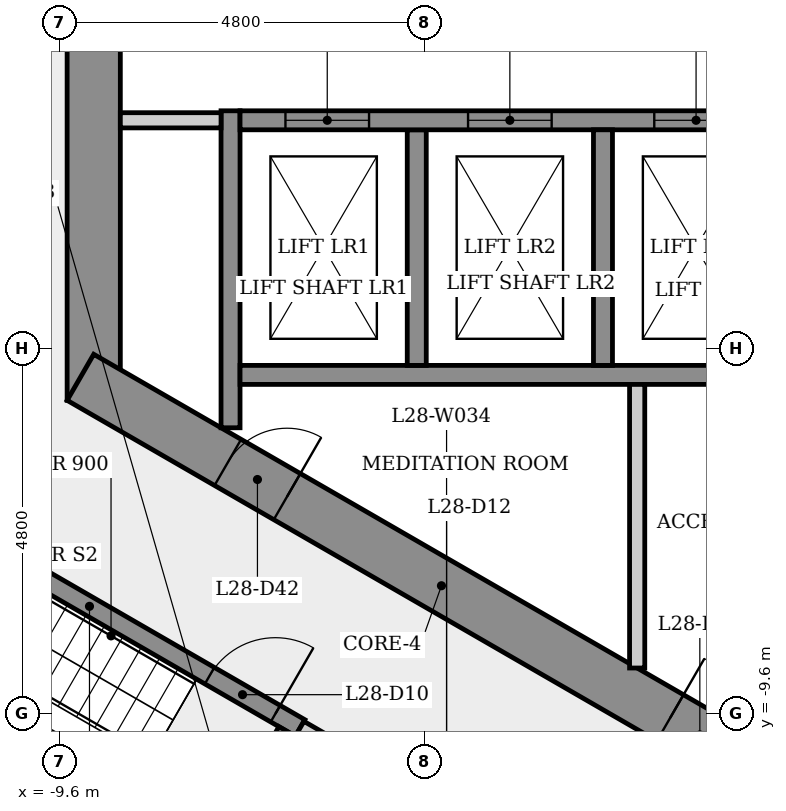
"""IFC4 building model, lengths in metres.
Left out: names, types, materials, properties, quantities, classifications, styles, units other than length and angle.
Written with IfcOpenShell. Run it as: python <this file> out.ifc"""

import sys

from ifc_helpers import new_model, si_unit, direction, frame, frame_2d, origin, place, context, subcontext, project, spatial, rectangle, extrude, element, fill, save


model = new_model("IFC4")
c1 = context("Model", 3, precision=1e-05, world=origin(), true_north=direction((0.0, 1.0)))
c2 = subcontext(c1, "Body", "Model", "MODEL_VIEW")
j1 = project(units=[si_unit("LENGTHUNIT", "METRE"), si_unit("PLANEANGLEUNIT", "RADIAN")], contexts=[c1])
p1 = place(None, origin())
s1 = spatial("IfcSite", under=j1, at=p1, CompositionType="ELEMENT")
p2 = place(p1, origin())
s2 = spatial("IfcBuilding", under=s1, at=p2, CompositionType="ELEMENT")
p3 = place(p2, frame((0.0, 0.0, 106.9)))
s3 = spatial("IfcBuildingStorey", under=s2, at=p3, CompositionType="ELEMENT", Elevation=106.9)
p4 = place(p3, frame((-9.15, 5.485, 0.0), z_axis=(0.0, 0.0, 1.0), x_axis=(0.0, -1.0, 0.0)))
e1 = element("IfcWall", 1, at=p4, inside=s3, PredefinedType="SHEAR", context=c2, shape_type="SweptSolid", body=[
    extrude(rectangle(XDim=10.97, YDim=0.7, at=frame_2d((5.485, 0.0))), origin(), (0.0, 0.0, 1.0), 3.4),
])
p5 = place(p4, frame((4.685, 0.0, 0.0)))
e2 = element("IfcOpeningElement", 2, at=p5, cuts=e1, PredefinedType="OPENING", context=c2, shape_type="SweptSolid", body=[
    extrude(rectangle(XDim=1.6, YDim=2.1, at=frame_2d((0.8, 1.05))), frame((0.0, 0.36, 0.0), z_axis=(0.0, -1.0, 0.0), x_axis=(1.0, 0.0, 0.0)), (0.0, 0.0, 1.0), 0.72),
])
p6 = place(p3, frame((-9.325, -5.182, 0.0), z_axis=(0.0, 0.0, 1.0), x_axis=(0.866023993627, -0.500002442456, 0.0)))
e3 = element("IfcWall", 3, at=p6, inside=s3, PredefinedType="SHEAR", context=c2, shape_type="SweptSolid", body=[
    extrude(rectangle(XDim=10.97, YDim=0.7, at=frame_2d((5.485, 0.0))), origin(), (0.0, 0.0, 1.0), 3.4),
])
p7 = place(p6, frame((2.239, 0.0, 0.0)))
e4 = element("IfcOpeningElement", 4, at=p7, cuts=e3, PredefinedType="OPENING", context=c2, shape_type="SweptSolid", body=[
    extrude(rectangle(XDim=0.9, YDim=2.1, at=frame_2d((0.45, 1.05))), frame((0.0, 0.36, 0.0), z_axis=(0.0, -1.0, 0.0), x_axis=(1.0, 0.0, 0.0)), (0.0, 0.0, 1.0), 0.72),
])
p8 = place(p6, frame((8.96, 0.0, 0.0)))
e5 = element("IfcOpeningElement", 5, at=p8, cuts=e3, PredefinedType="OPENING", context=c2, shape_type="SweptSolid", body=[
    extrude(rectangle(XDim=0.9, YDim=2.1, at=frame_2d((0.45, 1.05))), frame((0.0, 0.36, 0.0), z_axis=(0.0, -1.0, 0.0), x_axis=(1.0, 0.0, 0.0)), (0.0, 0.0, 1.0), 0.72),
])
p9 = place(p3, frame((-11.977, -6.595, 0.0), z_axis=(0.0, 0.0, 1.0), x_axis=(0.866025499775, -0.499999833739, 0.0)))
e6 = element("IfcWall", 6, at=p9, inside=s3, PredefinedType="SHEAR", context=c2, shape_type="SweptSolid", body=[
    extrude(rectangle(XDim=6.4, YDim=0.25, at=frame_2d((3.2, 0.0))), origin(), (0.0, 0.0, 1.0), 3.05),
])
p10 = place(p9, frame((5.025, 0.0, 0.0)))
e7 = element("IfcOpeningElement", 7, at=p10, cuts=e6, PredefinedType="OPENING", context=c2, shape_type="SweptSolid", body=[
    extrude(rectangle(XDim=1.0, YDim=2.1, at=frame_2d((0.5, 1.05))), frame((0.0, 0.135, 0.0), z_axis=(0.0, -1.0, 0.0), x_axis=(1.0, 0.0, 0.0)), (0.0, 0.0, 1.0), 0.27),
])
p11 = place(p3, frame((-7.935, -12.393, 0.0), z_axis=(0.0, 0.0, 1.0), x_axis=(-0.866025499775, 0.499999833739, 0.0)))
e8 = element("IfcWall", 8, at=p11, inside=s3, PredefinedType="SHEAR", context=c2, shape_type="SweptSolid", body=[
    extrude(rectangle(XDim=6.4, YDim=0.25, at=frame_2d((3.2, 0.0))), origin(), (0.0, 0.0, 1.0), 3.05),
])
p12 = place(p3, frame((-7.35, -5.846, 0.0), z_axis=(0.0, 0.0, 1.0), x_axis=(0.0, 1.0, 0.0)))
e9 = element("IfcWall", 9, at=p12, inside=s3, PredefinedType="SHEAR", context=c2, shape_type="SweptSolid", body=[
    extrude(rectangle(XDim=4.171, YDim=0.25, at=frame_2d((2.085, 0.0))), origin(), (0.0, 0.0, 1.0), 3.05),
])
p13 = place(p3, frame((-7.475, -1.8, 0.0), z_axis=(0.0, 0.0, 1.0), x_axis=(-1.0, 0.0, 0.0)))
e10 = element("IfcWall", 10, at=p13, inside=s3, PredefinedType="PARTITIONING", context=c2, shape_type="SweptSolid", body=[
    extrude(rectangle(XDim=1.325, YDim=0.2, at=frame_2d((0.663, 0.0))), origin(), (0.0, 0.0, 1.0), 3.05),
])
p14 = place(p3, frame((-6.605, -9.841, 0.0), z_axis=(0.0, 0.0, 1.0), x_axis=(-0.499996545922, -0.866027397988, 0.0)))
e11 = element("IfcWall", 11, at=p14, inside=s3, PredefinedType="SHEAR", context=c2, shape_type="SweptSolid", body=[
    extrude(rectangle(XDim=2.75, YDim=0.25, at=frame_2d((1.375, 0.0))), origin(), (0.0, 0.0, 1.0), 3.05),
])
p15 = place(p14, frame((0.875, 0.0, 0.0)))
e12 = element("IfcOpeningElement", 12, at=p15, cuts=e11, PredefinedType="OPENING", context=c2, shape_type="SweptSolid", body=[
    extrude(rectangle(XDim=1.0, YDim=2.1, at=frame_2d((0.5, 1.05))), frame((0.0, 0.135, 0.0), z_axis=(0.0, -1.0, 0.0), x_axis=(1.0, 0.0, 0.0)), (0.0, 0.0, 1.0), 0.27),
])
p16 = place(p3, frame((-6.435, -9.795, 0.0), z_axis=(0.0, 0.0, 1.0), x_axis=(0.866012907634, -0.500021643343, 0.0)))
e13 = element("IfcWall", 13, at=p16, inside=s3, PredefinedType="PARTITIONING", context=c2, shape_type="SweptSolid", body=[
    extrude(rectangle(XDim=4.45, YDim=0.2, at=frame_2d((2.225, 0.0))), origin(), (0.0, 0.0, 1.0), 3.05),
])
p17 = place(p16, frame((1.675, 0.0, 0.0)))
e14 = element("IfcOpeningElement", 14, at=p17, cuts=e13, PredefinedType="OPENING", context=c2, shape_type="SweptSolid", body=[
    extrude(rectangle(XDim=1.1, YDim=2.1, at=frame_2d((0.55, 1.05))), frame((0.0, 0.11, 0.0), z_axis=(0.0, -1.0, 0.0), x_axis=(1.0, 0.0, 0.0)), (0.0, 0.0, 1.0), 0.22),
])
p18 = place(p3, frame((-7.225, -5.15, 0.0), z_axis=(0.0, 0.0, 1.0), x_axis=(1.0, 0.0, 0.0)))
e15 = element("IfcWall", 15, at=p18, inside=s3, PredefinedType="SHEAR", context=c2, shape_type="SweptSolid", body=[
    extrude(rectangle(XDim=14.7, YDim=0.25, at=frame_2d((7.35, 0.0))), origin(), (0.0, 0.0, 1.0), 3.05),
])
p19 = place(p3, frame((-4.9, -1.925, 0.0), z_axis=(0.0, 0.0, 1.0), x_axis=(0.0, -1.0, 0.0)))
e16 = element("IfcWall", 16, at=p19, inside=s3, PredefinedType="SHEAR", context=c2, shape_type="SweptSolid", body=[
    extrude(rectangle(XDim=3.1, YDim=0.25, at=frame_2d((1.55, 0.0))), origin(), (0.0, 0.0, 1.0), 3.4),
])
p20 = place(p3, frame((-7.225, -1.8, 0.0), z_axis=(0.0, 0.0, 1.0), x_axis=(1.0, 0.0, 0.0)))
e17 = element("IfcWall", 17, at=p20, inside=s3, PredefinedType="SHEAR", context=c2, shape_type="SweptSolid", body=[
    extrude(rectangle(XDim=14.7, YDim=0.25, at=frame_2d((7.35, 0.0))), origin(), (0.0, 0.0, 1.0), 3.05),
])
p21 = place(p20, frame((0.597, 0.0, 0.0)))
e18 = element("IfcOpeningElement", 18, at=p21, cuts=e17, PredefinedType="OPENING", context=c2, shape_type="SweptSolid", body=[
    extrude(rectangle(XDim=1.1, YDim=2.1, at=frame_2d((0.55, 1.05))), frame((0.0, 0.135, 0.0), z_axis=(0.0, -1.0, 0.0), x_axis=(1.0, 0.0, 0.0)), (0.0, 0.0, 1.0), 0.27),
])
p22 = place(p20, frame((3.0, 0.0, 0.0)))
e19 = element("IfcOpeningElement", 19, at=p22, cuts=e17, PredefinedType="OPENING", context=c2, shape_type="SweptSolid", body=[
    extrude(rectangle(XDim=1.1, YDim=2.1, at=frame_2d((0.55, 1.05))), frame((0.0, 0.135, 0.0), z_axis=(0.0, -1.0, 0.0), x_axis=(1.0, 0.0, 0.0)), (0.0, 0.0, 1.0), 0.27),
])
p23 = place(p20, frame((5.45, 0.0, 0.0)))
e20 = element("IfcOpeningElement", 20, at=p23, cuts=e17, PredefinedType="OPENING", context=c2, shape_type="SweptSolid", body=[
    extrude(rectangle(XDim=1.1, YDim=2.1, at=frame_2d((0.55, 1.05))), frame((0.0, 0.135, 0.0), z_axis=(0.0, -1.0, 0.0), x_axis=(1.0, 0.0, 0.0)), (0.0, 0.0, 1.0), 0.27),
])
p24 = place(p20, frame((7.9, 0.0, 0.0)))
e21 = element("IfcOpeningElement", 21, at=p24, cuts=e17, PredefinedType="OPENING", context=c2, shape_type="SweptSolid", body=[
    extrude(rectangle(XDim=1.1, YDim=2.1, at=frame_2d((0.55, 1.05))), frame((0.0, 0.135, 0.0), z_axis=(0.0, -1.0, 0.0), x_axis=(1.0, 0.0, 0.0)), (0.0, 0.0, 1.0), 0.27),
])
p25 = place(p20, frame((10.35, 0.0, 0.0)))
e22 = element("IfcOpeningElement", 22, at=p25, cuts=e17, PredefinedType="OPENING", context=c2, shape_type="SweptSolid", body=[
    extrude(rectangle(XDim=1.1, YDim=2.1, at=frame_2d((0.55, 1.05))), frame((0.0, 0.135, 0.0), z_axis=(0.0, -1.0, 0.0), x_axis=(1.0, 0.0, 0.0)), (0.0, 0.0, 1.0), 0.27),
])
p26 = place(p3, frame((-2.45, -1.925, 0.0), z_axis=(0.0, 0.0, 1.0), x_axis=(0.0, -1.0, 0.0)))
e23 = element("IfcWall", 23, at=p26, inside=s3, PredefinedType="SHEAR", context=c2, shape_type="SweptSolid", body=[
    extrude(rectangle(XDim=3.1, YDim=0.25, at=frame_2d((1.55, 0.0))), origin(), (0.0, 0.0, 1.0), 3.4),
])
p27 = place(p3, frame((-2.0, -5.275, 0.0), z_axis=(0.0, 0.0, 1.0), x_axis=(0.0, -1.0, 0.0)))
e24 = element("IfcWall", 24, at=p27, inside=s3, PredefinedType="PARTITIONING", context=c2, shape_type="SweptSolid", body=[
    extrude(rectangle(XDim=3.732, YDim=0.2, at=frame_2d((1.866, 0.0))), origin(), (0.0, 0.0, 1.0), 3.05),
])
p28 = place(p21, origin())
e25 = element("IfcDoor", 25, at=p28, inside=s3, OperationType="SLIDING_TO_LEFT", PredefinedType="DOOR", context=c2, shape_type="SweptSolid", body=[
    extrude(rectangle(XDim=1.1, YDim=2.1, at=frame_2d((0.55, 1.05))), frame((0.0, 0.025, 0.0), z_axis=(0.0, -1.0, 0.0), x_axis=(1.0, 0.0, 0.0)), (0.0, 0.0, 1.0), 0.05),
])
fill(e18, e25)
p29 = place(p22, origin())
e26 = element("IfcDoor", 26, at=p29, inside=s3, OperationType="SLIDING_TO_LEFT", PredefinedType="DOOR", context=c2, shape_type="SweptSolid", body=[
    extrude(rectangle(XDim=1.1, YDim=2.1, at=frame_2d((0.55, 1.05))), frame((0.0, 0.025, 0.0), z_axis=(0.0, -1.0, 0.0), x_axis=(1.0, 0.0, 0.0)), (0.0, 0.0, 1.0), 0.05),
])
fill(e19, e26)
p30 = place(p23, origin())
e27 = element("IfcDoor", 27, at=p30, inside=s3, OperationType="SLIDING_TO_LEFT", PredefinedType="DOOR", context=c2, shape_type="SweptSolid", body=[
    extrude(rectangle(XDim=1.1, YDim=2.1, at=frame_2d((0.55, 1.05))), frame((0.0, 0.025, 0.0), z_axis=(0.0, -1.0, 0.0), x_axis=(1.0, 0.0, 0.0)), (0.0, 0.0, 1.0), 0.05),
])
fill(e20, e27)
p31 = place(p10, origin())
e28 = element("IfcDoor", 28, at=p31, inside=s3, OperationType="SINGLE_SWING_RIGHT", PredefinedType="DOOR", context=c2, shape_type="SweptSolid", body=[
    extrude(rectangle(XDim=1.0, YDim=2.1, at=frame_2d((0.5, 1.05))), frame((0.0, 0.025, 0.0), z_axis=(0.0, -1.0, 0.0), x_axis=(1.0, 0.0, 0.0)), (0.0, 0.0, 1.0), 0.05),
])
fill(e7, e28)
p32 = place(p7, origin())
e29 = element("IfcDoor", 29, at=p32, inside=s3, OperationType="SINGLE_SWING_RIGHT", PredefinedType="DOOR", context=c2, shape_type="SweptSolid", body=[
    extrude(rectangle(XDim=0.9, YDim=2.1, at=frame_2d((0.45, 1.05))), frame((0.0, 0.025, 0.0), z_axis=(0.0, -1.0, 0.0), x_axis=(1.0, 0.0, 0.0)), (0.0, 0.0, 1.0), 0.05),
])
fill(e4, e29)
p33 = place(p8, origin())
e30 = element("IfcDoor", 30, at=p33, inside=s3, OperationType="SINGLE_SWING_LEFT", PredefinedType="DOOR", context=c2, shape_type="SweptSolid", body=[
    extrude(rectangle(XDim=0.9, YDim=2.1, at=frame_2d((0.45, 1.05))), frame((0.0, 0.025, 0.0), z_axis=(0.0, -1.0, 0.0), x_axis=(1.0, 0.0, 0.0)), (0.0, 0.0, 1.0), 0.05),
])
fill(e5, e30)
save(model, sys.argv[1])
